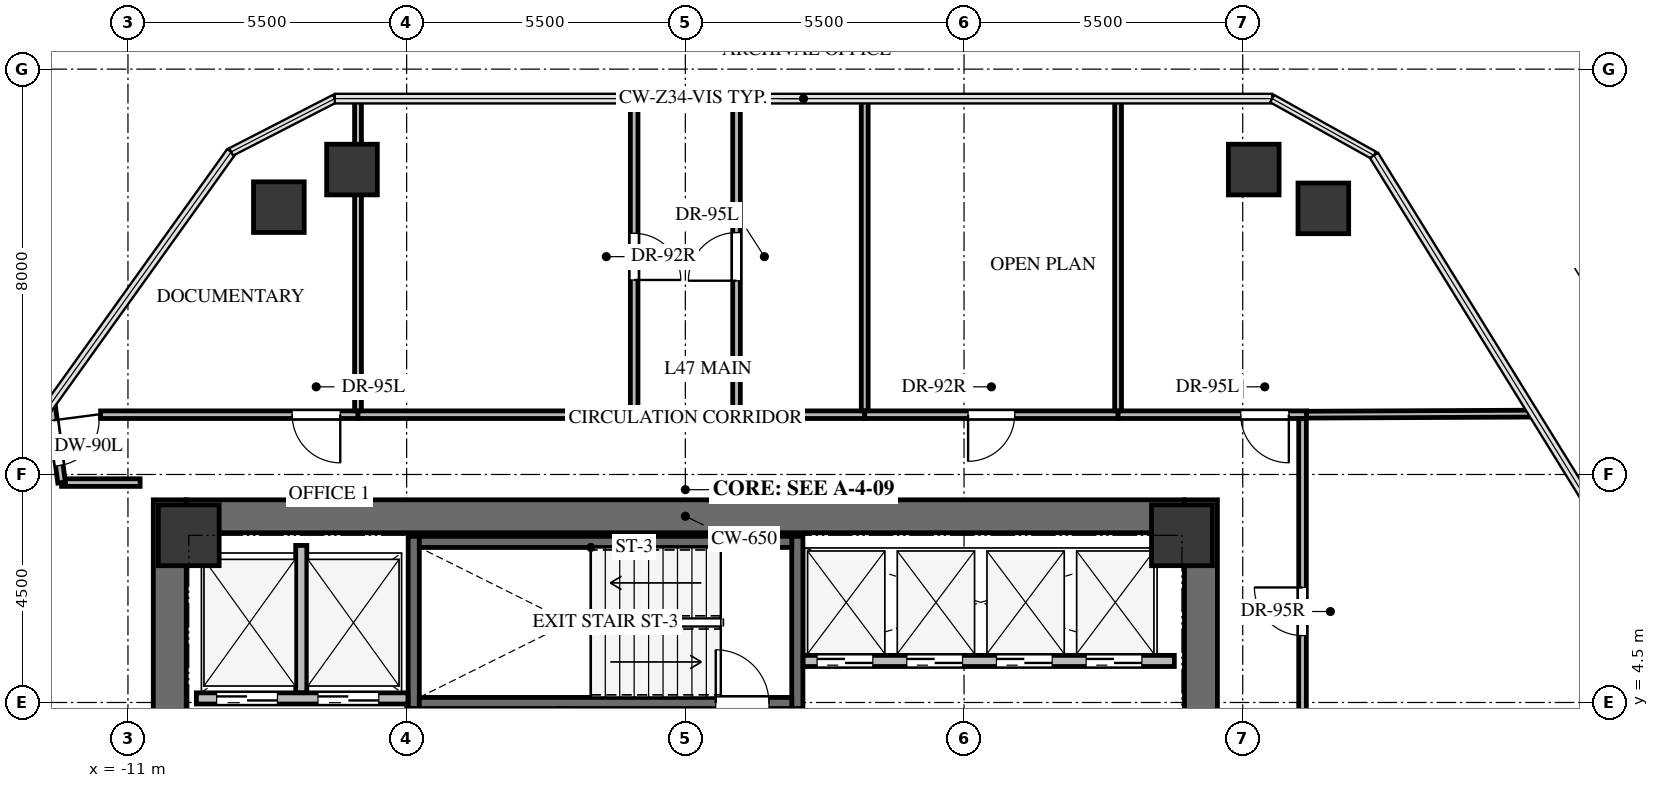
"""IFC4 building model, lengths in metres.
Left out: names, types, materials, properties, quantities, classifications, styles, units other than length and angle.
Written with IfcOpenShell. Run it as: python <this file> out.ifc"""

import sys

from ifc_helpers import new_model, si_unit, direction, frame, frame_2d, origin, origin_2d, place, context, subcontext, project, spatial, rectangle, extrude, source, transform, mapped, element, fill, save


model = new_model("IFC4")
c1 = context("Model", 3, precision=1e-05, world=origin(), true_north=direction((0.0, 1.0)))
c2 = subcontext(c1, "Body", "Model", "MODEL_VIEW")
j1 = project(units=[si_unit("LENGTHUNIT", "METRE"), si_unit("PLANEANGLEUNIT", "RADIAN")], contexts=[c1])
p1 = place(None, origin())
s1 = spatial("IfcSite", under=j1, at=p1, CompositionType="ELEMENT")
p2 = place(p1, origin())
s2 = spatial("IfcBuilding", under=s1, at=p2, CompositionType="ELEMENT")
p3 = place(p2, frame((0.0, 0.0, 173.8)))
s3 = spatial("IfcBuildingStorey", under=s2, at=p3, CompositionType="ELEMENT", Elevation=173.8)
for number, where, z_axis, x_axis in (
    (1, (-10.175, -8.5, 0.0), (0.0, 0.0, 1.0), (0.0, 1.0, 0.0)),
    (2, (10.175, -8.5, 0.0), (0.0, 0.0, 1.0), (0.0, 1.0, 0.0)),
):
    element("IfcWall", number, at=place(p3, frame(where, z_axis=z_axis, x_axis=x_axis)), inside=s3, PredefinedType="SHEAR", context=c2, shape_type="SweptSolid", body=[
        extrude(rectangle(XDim=17.0, YDim=0.65, at=frame_2d((8.5, 0.0))), origin(), (0.0, 0.0, 1.0), 3.3),
    ])
p4 = place(p3, frame((-9.85, 8.175, 0.0), z_axis=(0.0, 0.0, 1.0), x_axis=(1.0, 0.0, 0.0)))
e3 = element("IfcWall", 3, at=p4, inside=s3, PredefinedType="SHEAR", context=c2, shape_type="SweptSolid", body=[
    extrude(rectangle(XDim=19.7, YDim=0.65, at=frame_2d((9.85, 0.0))), origin(), (0.0, 0.0, 1.0), 3.3),
])
for number, where, z_axis, x_axis in (
    (4, (2.21, 4.38, -0.24), (0.0, 0.0, 1.0), (0.0, 1.0, 0.0)),
    (5, (-5.36, 7.78, -0.24), (0.0, 0.0, 1.0), (0.0, -1.0, 0.0)),
):
    element("IfcWall", number, at=place(p3, frame(where, z_axis=z_axis, x_axis=x_axis)), inside=s3, PredefinedType="SHEAR", context=c2, shape_type="SweptSolid", body=[
        extrude(rectangle(XDim=3.4, YDim=0.22, at=frame_2d((1.7, 0.0))), origin(), (0.0, 0.0, 1.0), 3.3),
    ])
p5 = place(p3, frame((-5.25, 4.49, -0.24), z_axis=(0.0, 0.0, 1.0), x_axis=(1.0, 0.0, 0.0)))
e6 = element("IfcWall", 6, at=p5, inside=s3, PredefinedType="SHEAR", context=c2, shape_type="SweptSolid", body=[
    extrude(rectangle(XDim=7.35, YDim=0.22, at=frame_2d((3.675, 0.0))), origin(), (0.0, 0.0, 1.0), 3.3),
])
p6 = place(p5, frame((5.85, 0.0, 0.0)))
e7 = element("IfcOpeningElement", 7, at=p6, cuts=e6, PredefinedType="OPENING", context=c2, shape_type="SweptSolid", body=[
    extrude(rectangle(XDim=1.05, YDim=2.15, at=frame_2d((0.525, 1.075))), frame((0.0, 0.12, 0.0), z_axis=(0.0, -1.0, 0.0), x_axis=(1.0, 0.0, 0.0)), (0.0, 0.0, 1.0), 0.24),
])
p7 = place(p3, frame((2.1, 7.67, -0.24), z_axis=(0.0, 0.0, 1.0), x_axis=(-1.0, 0.0, 0.0)))
e8 = element("IfcWall", 8, at=p7, inside=s3, PredefinedType="SHEAR", context=c2, shape_type="SweptSolid", body=[
    extrude(rectangle(XDim=7.35, YDim=0.22, at=frame_2d((3.675, 0.0))), origin(), (0.0, 0.0, 1.0), 3.3),
])
m1 = source(origin(), c2, "Body", "SweptSolid", [
    extrude(rectangle(XDim=1.2, YDim=1.2, at=origin_2d()), origin(), (0.0, 0.0, 1.0), 3.3),
])
for number, where, z_axis, x_axis in (
    (9, (9.8, 7.8, -0.24), (0.0, 0.0, 1.0), (1.0, 0.0, 0.0)),
    (10, (-9.8, 7.8, -0.24), (0.0, 0.0, 1.0), (1.0, 0.0, 0.0)),
):
    element("IfcColumn", number, at=place(p3, frame(where, z_axis=z_axis, x_axis=x_axis)), inside=s3, PredefinedType="COLUMN", context=c2, shape_type="MappedRepresentation", body=[
        mapped(m1, transform((0.0, 0.0, 0.0), x_axis=(1.0, 0.0, 0.0), y_axis=(0.0, 1.0, 0.0), z_axis=(0.0, 0.0, 1.0), scale=1.0)),
    ])
m2 = source(origin(), c2, "Body", "SweptSolid", [
    extrude(rectangle(XDim=1.0, YDim=1.0, at=origin_2d()), origin(), (0.0, 0.0, 1.0), 3.3),
])
for number, where, z_axis, x_axis in (
    (11, (-8.022, 14.276, -0.24), (0.0, 0.0, 1.0), (1.0, 0.0, 0.0)),
    (12, (-6.579, 15.018, -0.24), (0.0, 0.0, 1.0), (1.0, 0.0, 0.0)),
    (13, (11.218, 15.018, -0.24), (0.0, 0.0, 1.0), (1.0, 0.0, 0.0)),
    (14, (12.591, 14.252, -0.24), (0.0, 0.0, 1.0), (1.0, 0.0, 0.0)),
):
    element("IfcColumn", number, at=place(p3, frame(where, z_axis=z_axis, x_axis=x_axis)), inside=s3, PredefinedType="COLUMN", context=c2, shape_type="MappedRepresentation", body=[
        mapped(m2, transform((0.0, 0.0, 0.0), x_axis=(1.0, 0.0, 0.0), y_axis=(0.0, 1.0, 0.0), z_axis=(0.0, 0.0, 1.0), scale=1.0)),
    ])
p8 = place(p3, frame((-9.65, 4.58, 0.0), z_axis=(0.0, 0.0, 1.0), x_axis=(1.0, 0.0, 0.0)))
e15 = element("IfcWall", 15, at=p8, inside=s3, PredefinedType="SOLIDWALL", context=c2, shape_type="SweptSolid", body=[
    extrude(rectangle(XDim=4.175, YDim=0.22, at=frame_2d((2.087, 0.0))), origin(), (0.0, 0.0, 1.0), 3.045),
])
p9 = place(p8, frame((0.4, 0.0, 0.0)))
e16 = element("IfcOpeningElement", 16, at=p9, cuts=e15, PredefinedType="OPENING", context=c2, shape_type="SweptSolid", body=[
    extrude(rectangle(XDim=1.2, YDim=2.15, at=frame_2d((0.6, 1.075))), frame((0.0, 0.12, 0.0), z_axis=(0.0, -1.0, 0.0), x_axis=(1.0, 0.0, 0.0)), (0.0, 0.0, 1.0), 0.24),
])
p10 = place(p8, frame((2.4, 0.0, 0.0)))
e17 = element("IfcOpeningElement", 17, at=p10, cuts=e15, PredefinedType="OPENING", context=c2, shape_type="SweptSolid", body=[
    extrude(rectangle(XDim=1.2, YDim=2.15, at=frame_2d((0.6, 1.075))), frame((0.0, 0.12, 0.0), z_axis=(0.0, -1.0, 0.0), x_axis=(1.0, 0.0, 0.0)), (0.0, 0.0, 1.0), 0.24),
])
p11 = place(p3, frame((-7.58, 4.694, 0.0), z_axis=(0.0, 0.0, 1.0), x_axis=(0.0, 1.0, 0.0)))
e18 = element("IfcWall", 18, at=p11, inside=s3, PredefinedType="SOLIDWALL", context=c2, shape_type="SweptSolid", body=[
    extrude(rectangle(XDim=2.906, YDim=0.22, at=frame_2d((1.453, 0.0))), origin(), (0.0, 0.0, 1.0), 3.045),
])
p12 = place(p3, frame((2.325, 5.32, 0.0), z_axis=(0.0, 0.0, 1.0), x_axis=(1.0, 0.0, 0.0)))
e19 = element("IfcWall", 19, at=p12, inside=s3, PredefinedType="SOLIDWALL", context=c2, shape_type="SweptSolid", body=[
    extrude(rectangle(XDim=7.325, YDim=0.22, at=frame_2d((3.663, 0.0))), origin(), (0.0, 0.0, 1.0), 3.045),
])
p13 = place(p12, frame((0.275, 0.0, 0.0)))
e20 = element("IfcOpeningElement", 20, at=p13, cuts=e19, PredefinedType="OPENING", context=c2, shape_type="SweptSolid", body=[
    extrude(rectangle(XDim=1.1, YDim=2.15, at=frame_2d((0.55, 1.075))), frame((0.0, 0.12, 0.0), z_axis=(0.0, -1.0, 0.0), x_axis=(1.0, 0.0, 0.0)), (0.0, 0.0, 1.0), 0.24),
])
p14 = place(p12, frame((2.045, 0.0, 0.0)))
e21 = element("IfcOpeningElement", 21, at=p14, cuts=e19, PredefinedType="OPENING", context=c2, shape_type="SweptSolid", body=[
    extrude(rectangle(XDim=1.1, YDim=2.15, at=frame_2d((0.55, 1.075))), frame((0.0, 0.12, 0.0), z_axis=(0.0, -1.0, 0.0), x_axis=(1.0, 0.0, 0.0)), (0.0, 0.0, 1.0), 0.24),
])
p15 = place(p12, frame((3.815, 0.0, 0.0)))
e22 = element("IfcOpeningElement", 22, at=p15, cuts=e19, PredefinedType="OPENING", context=c2, shape_type="SweptSolid", body=[
    extrude(rectangle(XDim=1.1, YDim=2.15, at=frame_2d((0.55, 1.075))), frame((0.0, 0.12, 0.0), z_axis=(0.0, -1.0, 0.0), x_axis=(1.0, 0.0, 0.0)), (0.0, 0.0, 1.0), 0.24),
])
p16 = place(p12, frame((5.585, 0.0, 0.0)))
e23 = element("IfcOpeningElement", 23, at=p16, cuts=e19, PredefinedType="OPENING", context=c2, shape_type="SweptSolid", body=[
    extrude(rectangle(XDim=1.1, YDim=2.15, at=frame_2d((0.55, 1.075))), frame((0.0, 0.12, 0.0), z_axis=(0.0, -1.0, 0.0), x_axis=(1.0, 0.0, 0.0)), (0.0, 0.0, 1.0), 0.24),
])
p17 = place(p3, frame((-6.46, 10.18, 0.0), z_axis=(0.0, 0.0, 1.0), x_axis=(-1.0, 0.0, 0.0)))
e24 = element("IfcWall", 24, at=p17, inside=s3, PredefinedType="PARTITIONING", context=c2, shape_type="SweptSolid", body=[
    extrude(rectangle(XDim=5.08, YDim=0.15, at=frame_2d((2.54, 0.0))), origin(), (0.0, 0.0, 1.0), 2.242),
])
p18 = place(p17, frame((0.35, 0.0, 0.0)))
e25 = element("IfcOpeningElement", 25, at=p18, cuts=e24, PredefinedType="OPENING", context=c2, shape_type="SweptSolid", body=[
    extrude(rectangle(XDim=0.95, YDim=2.1, at=frame_2d((0.475, 1.05))), frame((0.0, 0.085, 0.0), z_axis=(0.0, -1.0, 0.0), x_axis=(1.0, 0.0, 0.0)), (0.0, 0.0, 1.0), 0.17),
])
p19 = place(p3, frame((-1.01, 16.418, 0.0), z_axis=(0.0, 0.0, 1.0), x_axis=(0.0, -1.0, 0.0)))
e26 = element("IfcWall", 26, at=p19, inside=s3, PredefinedType="PARTITIONING", context=c2, shape_type="SweptSolid", body=[
    extrude(rectangle(XDim=6.238, YDim=0.15, at=frame_2d((3.119, 0.0))), origin(), (0.0, 0.0, 1.0), 2.399),
])
p20 = place(p19, frame((2.659, 0.0, 0.0)))
e27 = element("IfcOpeningElement", 27, at=p20, cuts=e26, PredefinedType="OPENING", context=c2, shape_type="SweptSolid", body=[
    extrude(rectangle(XDim=0.92, YDim=2.1, at=frame_2d((0.46, 1.05))), frame((0.0, 0.085, 0.0), z_axis=(0.0, -1.0, 0.0), x_axis=(1.0, 0.0, 0.0)), (0.0, 0.0, 1.0), 0.17),
])
p21 = place(p3, frame((-1.089, 10.18, 0.0), z_axis=(0.0, 0.0, 1.0), x_axis=(-1.0, 0.0, 0.0)))
e28 = element("IfcWall", 28, at=p21, inside=s3, PredefinedType="PARTITIONING", context=c2, shape_type="SweptSolid", body=[
    extrude(rectangle(XDim=5.371, YDim=0.15, at=frame_2d((2.686, 0.0))), origin(), (0.0, 0.0, 1.0), 2.242),
])
p22 = place(p3, frame((1.01, 10.18, 0.0), z_axis=(0.0, 0.0, 1.0), x_axis=(0.0, 1.0, 0.0)))
e29 = element("IfcWall", 29, at=p22, inside=s3, PredefinedType="PARTITIONING", context=c2, shape_type="SweptSolid", body=[
    extrude(rectangle(XDim=6.238, YDim=0.15, at=frame_2d((3.119, 0.0))), origin(), (0.0, 0.0, 1.0), 2.399),
])
p23 = place(p22, frame((2.644, 0.0, 0.0)))
e30 = element("IfcOpeningElement", 30, at=p23, cuts=e29, PredefinedType="OPENING", context=c2, shape_type="SweptSolid", body=[
    extrude(rectangle(XDim=0.95, YDim=2.1, at=frame_2d((0.475, 1.05))), frame((0.0, 0.085, 0.0), z_axis=(0.0, -1.0, 0.0), x_axis=(1.0, 0.0, 0.0)), (0.0, 0.0, 1.0), 0.17),
])
p24 = place(p3, frame((3.54, 10.18, 0.0), z_axis=(0.0, 0.0, 1.0), x_axis=(-1.0, 0.0, 0.0)))
e31 = element("IfcWall", 31, at=p24, inside=s3, PredefinedType="PARTITIONING", context=c2, shape_type="SweptSolid", body=[
    extrude(rectangle(XDim=2.451, YDim=0.15, at=frame_2d((1.226, 0.0))), origin(), (0.0, 0.0, 1.0), 3.045),
])
p25 = place(p3, frame((8.54, 10.18, 0.0), z_axis=(0.0, 0.0, 1.0), x_axis=(-1.0, 0.0, 0.0)))
e32 = element("IfcWall", 32, at=p25, inside=s3, PredefinedType="PARTITIONING", context=c2, shape_type="SweptSolid", body=[
    extrude(rectangle(XDim=5.0, YDim=0.15, at=frame_2d((2.5, 0.0))), origin(), (0.0, 0.0, 1.0), 2.608),
])
p26 = place(p25, frame((2.04, 0.0, 0.0)))
e33 = element("IfcOpeningElement", 33, at=p26, cuts=e32, PredefinedType="OPENING", context=c2, shape_type="SweptSolid", body=[
    extrude(rectangle(XDim=0.92, YDim=2.1, at=frame_2d((0.46, 1.05))), frame((0.0, 0.085, 0.0), z_axis=(0.0, -1.0, 0.0), x_axis=(1.0, 0.0, 0.0)), (0.0, 0.0, 1.0), 0.17),
])
p27 = place(p3, frame((12.26, 10.18, 0.0), z_axis=(0.0, 0.0, 1.0), x_axis=(-1.0, 0.0, 0.0)))
e34 = element("IfcWall", 34, at=p27, inside=s3, PredefinedType="PARTITIONING", context=c2, shape_type="SweptSolid", body=[
    extrude(rectangle(XDim=3.72, YDim=0.15, at=frame_2d((1.86, 0.0))), origin(), (0.0, 0.0, 1.0), 2.242),
])
p28 = place(p27, frame((0.35, 0.0, 0.0)))
e35 = element("IfcOpeningElement", 35, at=p28, cuts=e34, PredefinedType="OPENING", context=c2, shape_type="SweptSolid", body=[
    extrude(rectangle(XDim=0.95, YDim=2.1, at=frame_2d((0.475, 1.05))), frame((0.0, 0.085, 0.0), z_axis=(0.0, -1.0, 0.0), x_axis=(1.0, 0.0, 0.0)), (0.0, 0.0, 1.0), 0.17),
])
p29 = place(p3, frame((-12.31, 8.84, 0.0), z_axis=(0.0, 0.0, 1.0), x_axis=(1.0, 0.0, 0.0)))
e36 = element("IfcWall", 36, at=p29, inside=s3, PredefinedType="PARTITIONING", context=c2, shape_type="SweptSolid", body=[
    extrude(rectangle(XDim=1.55, YDim=0.15, at=frame_2d((0.775, 0.0))), origin(), (0.0, 0.0, 1.0), 2.399),
])
p30 = place(p3, frame((-12.514, 10.406, 0.0), z_axis=(0.0, 0.0, 1.0), x_axis=(0.129378833178, -0.991595238757, 0.0)))
e37 = element("IfcWall", 37, at=p30, inside=s3, PredefinedType="PARTITIONING", context=c2, shape_type="SweptSolid", body=[
    extrude(rectangle(XDim=1.579, YDim=0.15, at=frame_2d((0.79, 0.0))), origin(), (0.0, 0.0, 1.0), 3.045),
])
p31 = place(p30, frame((0.34, 0.0, 0.0)))
e38 = element("IfcOpeningElement", 38, at=p31, cuts=e37, PredefinedType="OPENING", context=c2, shape_type="SweptSolid", body=[
    extrude(rectangle(XDim=0.9, YDim=2.05, at=frame_2d((0.45, 1.025))), frame((0.0, 0.085, 0.0), z_axis=(0.0, -1.0, 0.0), x_axis=(1.0, 0.0, 0.0)), (0.0, 0.0, 1.0), 0.17),
])
p32 = place(p3, frame((12.18, 2.49, 0.0), z_axis=(0.0, 0.0, 1.0), x_axis=(0.0, 1.0, 0.0)))
e39 = element("IfcWall", 39, at=p32, inside=s3, PredefinedType="PARTITIONING", context=c2, shape_type="SweptSolid", body=[
    extrude(rectangle(XDim=7.611, YDim=0.15, at=frame_2d((3.806, 0.0))), origin(), (0.0, 0.0, 1.0), 3.045),
])
p33 = place(p32, frame((3.331, 0.0, 0.0)))
e40 = element("IfcOpeningElement", 40, at=p33, cuts=e39, PredefinedType="OPENING", context=c2, shape_type="SweptSolid", body=[
    extrude(rectangle(XDim=0.95, YDim=2.1, at=frame_2d((0.475, 1.05))), frame((0.0, 0.085, 0.0), z_axis=(0.0, -1.0, 0.0), x_axis=(1.0, 0.0, 0.0)), (0.0, 0.0, 1.0), 0.17),
])
p34 = place(p3, frame((-6.46, 15.102, 0.0), z_axis=(0.0, 0.0, 1.0), x_axis=(0.0, -1.0, 0.0)))
e41 = element("IfcWall", 41, at=p34, inside=s3, PredefinedType="PARTITIONING", context=c2, shape_type="SweptSolid", body=[
    extrude(rectangle(XDim=4.843, YDim=0.135, at=frame_2d((2.421, 0.0))), origin(), (0.0, 0.0, 1.0), 2.242),
])
p35 = place(p3, frame((-6.46, 16.418, 0.0), z_axis=(0.0, 0.0, 1.0), x_axis=(0.0, -1.0, 0.0)))
e42 = element("IfcWall", 42, at=p35, inside=s3, PredefinedType="PARTITIONING", context=c2, shape_type="SweptSolid", body=[
    extrude(rectangle(XDim=1.316, YDim=0.135, at=frame_2d((0.658, 0.0))), origin(), (0.0, 0.0, 1.0), 1.877),
])
for number, where, z_axis, x_axis in (
    (43, (3.54, 16.418, 0.0), (0.0, 0.0, 1.0), (0.0, -1.0, 0.0)),
    (44, (8.54, 16.418, 0.0), (0.0, 0.0, 1.0), (0.0, -1.0, 0.0)),
):
    element("IfcWall", number, at=place(p3, frame(where, z_axis=z_axis, x_axis=x_axis)), inside=s3, PredefinedType="PARTITIONING", context=c2, shape_type="SweptSolid", body=[
        extrude(rectangle(XDim=6.159, YDim=0.135, at=frame_2d((3.08, 0.0))), origin(), (0.0, 0.0, 1.0), 2.399),
    ])
p36 = place(p3, frame((16.74, 10.201, 0.0), z_axis=(0.0, 0.0, 1.0), x_axis=(-0.999989522694, -0.004577608714, 0.0)))
e45 = element("IfcWall", 45, at=p36, inside=s3, PredefinedType="PARTITIONING", context=c2, shape_type="SweptSolid", body=[
    extrude(rectangle(XDim=4.48, YDim=0.135, at=frame_2d((2.24, 0.0))), origin(), (0.0, 0.0, 1.0), 2.399),
])
m3 = source(origin(), c2, "Body", "SweptSolid", [
    extrude(rectangle(XDim=1.05, YDim=2.15, at=frame_2d((0.525, 1.075))), frame((0.0, 0.025, 0.0), z_axis=(0.0, -1.0, 0.0), x_axis=(1.0, 0.0, 0.0)), (0.0, 0.0, 1.0), 0.05),
])
p37 = place(p6, origin())
e46 = element("IfcDoor", 46, at=p37, inside=s3, OperationType="SINGLE_SWING_LEFT", PredefinedType="DOOR", context=c2, shape_type="MappedRepresentation", body=[
    mapped(m3, transform((0.0, 0.0, 0.0), x_axis=(1.0, 0.0, 0.0), y_axis=(0.0, 1.0, 0.0), z_axis=(0.0, 0.0, 1.0), scale=1.0)),
])
fill(e7, e46)
m4 = source(origin(), c2, "Body", "SweptSolid", [
    extrude(rectangle(XDim=1.2, YDim=2.15, at=frame_2d((0.6, 1.075))), frame((0.0, 0.025, 0.0), z_axis=(0.0, -1.0, 0.0), x_axis=(1.0, 0.0, 0.0)), (0.0, 0.0, 1.0), 0.05),
])
p38 = place(p9, origin())
e47 = element("IfcDoor", 47, at=p38, inside=s3, OperationType="DOUBLE_DOOR_SLIDING", PredefinedType="DOOR", context=c2, shape_type="MappedRepresentation", body=[
    mapped(m4, transform((0.0, 0.0, 0.0), x_axis=(1.0, 0.0, 0.0), y_axis=(0.0, 1.0, 0.0), z_axis=(0.0, 0.0, 1.0), scale=1.0)),
])
fill(e16, e47)
p39 = place(p10, origin())
e48 = element("IfcDoor", 48, at=p39, inside=s3, OperationType="DOUBLE_DOOR_SLIDING", PredefinedType="DOOR", context=c2, shape_type="MappedRepresentation", body=[
    mapped(m4, transform((0.0, 0.0, 0.0), x_axis=(1.0, 0.0, 0.0), y_axis=(0.0, 1.0, 0.0), z_axis=(0.0, 0.0, 1.0), scale=1.0)),
])
fill(e17, e48)
m5 = source(origin(), c2, "Body", "SweptSolid", [
    extrude(rectangle(XDim=1.1, YDim=2.15, at=frame_2d((0.55, 1.075))), frame((0.0, 0.025, 0.0), z_axis=(0.0, -1.0, 0.0), x_axis=(1.0, 0.0, 0.0)), (0.0, 0.0, 1.0), 0.05),
])
p40 = place(p13, origin())
e49 = element("IfcDoor", 49, at=p40, inside=s3, OperationType="DOUBLE_DOOR_SLIDING", PredefinedType="DOOR", context=c2, shape_type="MappedRepresentation", body=[
    mapped(m5, transform((0.0, 0.0, 0.0), x_axis=(1.0, 0.0, 0.0), y_axis=(0.0, 1.0, 0.0), z_axis=(0.0, 0.0, 1.0), scale=1.0)),
])
fill(e20, e49)
p41 = place(p14, origin())
e50 = element("IfcDoor", 50, at=p41, inside=s3, OperationType="DOUBLE_DOOR_SLIDING", PredefinedType="DOOR", context=c2, shape_type="MappedRepresentation", body=[
    mapped(m5, transform((0.0, 0.0, 0.0), x_axis=(1.0, 0.0, 0.0), y_axis=(0.0, 1.0, 0.0), z_axis=(0.0, 0.0, 1.0), scale=1.0)),
])
fill(e21, e50)
p42 = place(p15, origin())
e51 = element("IfcDoor", 51, at=p42, inside=s3, OperationType="DOUBLE_DOOR_SLIDING", PredefinedType="DOOR", context=c2, shape_type="MappedRepresentation", body=[
    mapped(m5, transform((0.0, 0.0, 0.0), x_axis=(1.0, 0.0, 0.0), y_axis=(0.0, 1.0, 0.0), z_axis=(0.0, 0.0, 1.0), scale=1.0)),
])
fill(e22, e51)
p43 = place(p16, origin())
e52 = element("IfcDoor", 52, at=p43, inside=s3, OperationType="DOUBLE_DOOR_SLIDING", PredefinedType="DOOR", context=c2, shape_type="MappedRepresentation", body=[
    mapped(m5, transform((0.0, 0.0, 0.0), x_axis=(1.0, 0.0, 0.0), y_axis=(0.0, 1.0, 0.0), z_axis=(0.0, 0.0, 1.0), scale=1.0)),
])
fill(e23, e52)
m6 = source(origin(), c2, "Body", "SweptSolid", [
    extrude(rectangle(XDim=0.95, YDim=2.1, at=frame_2d((0.475, 1.05))), frame((0.0, 0.025, 0.0), z_axis=(0.0, -1.0, 0.0), x_axis=(1.0, 0.0, 0.0)), (0.0, 0.0, 1.0), 0.05),
])
p44 = place(p18, origin())
e53 = element("IfcDoor", 53, at=p44, inside=s3, OperationType="SINGLE_SWING_LEFT", PredefinedType="DOOR", context=c2, shape_type="MappedRepresentation", body=[
    mapped(m6, transform((0.0, 0.0, 0.0), x_axis=(1.0, 0.0, 0.0), y_axis=(0.0, 1.0, 0.0), z_axis=(0.0, 0.0, 1.0), scale=1.0)),
])
fill(e25, e53)
m7 = source(origin(), c2, "Body", "SweptSolid", [
    extrude(rectangle(XDim=0.92, YDim=2.1, at=frame_2d((0.46, 1.05))), frame((0.0, 0.025, 0.0), z_axis=(0.0, -1.0, 0.0), x_axis=(1.0, 0.0, 0.0)), (0.0, 0.0, 1.0), 0.05),
])
p45 = place(p20, origin())
e54 = element("IfcDoor", 54, at=p45, inside=s3, OperationType="SINGLE_SWING_RIGHT", PredefinedType="DOOR", context=c2, shape_type="MappedRepresentation", body=[
    mapped(m7, transform((0.0, 0.0, 0.0), x_axis=(1.0, 0.0, 0.0), y_axis=(0.0, 1.0, 0.0), z_axis=(0.0, 0.0, 1.0), scale=1.0)),
])
fill(e27, e54)
p46 = place(p23, origin())
e55 = element("IfcDoor", 55, at=p46, inside=s3, OperationType="SINGLE_SWING_LEFT", PredefinedType="DOOR", context=c2, shape_type="MappedRepresentation", body=[
    mapped(m6, transform((0.0, 0.0, 0.0), x_axis=(1.0, 0.0, 0.0), y_axis=(0.0, 1.0, 0.0), z_axis=(0.0, 0.0, 1.0), scale=1.0)),
])
fill(e30, e55)
p47 = place(p26, origin())
e56 = element("IfcDoor", 56, at=p47, inside=s3, OperationType="SINGLE_SWING_RIGHT", PredefinedType="DOOR", context=c2, shape_type="MappedRepresentation", body=[
    mapped(m7, transform((0.0, 0.0, 0.0), x_axis=(1.0, 0.0, 0.0), y_axis=(0.0, 1.0, 0.0), z_axis=(0.0, 0.0, 1.0), scale=1.0)),
])
fill(e33, e56)
p48 = place(p28, origin())
e57 = element("IfcDoor", 57, at=p48, inside=s3, OperationType="SINGLE_SWING_LEFT", PredefinedType="DOOR", context=c2, shape_type="MappedRepresentation", body=[
    mapped(m6, transform((0.0, 0.0, 0.0), x_axis=(1.0, 0.0, 0.0), y_axis=(0.0, 1.0, 0.0), z_axis=(0.0, 0.0, 1.0), scale=1.0)),
])
fill(e35, e57)
m8 = source(origin(), c2, "Body", "SweptSolid", [
    extrude(rectangle(XDim=0.9, YDim=2.05, at=frame_2d((0.45, 1.025))), frame((0.0, 0.025, 0.0), z_axis=(0.0, -1.0, 0.0), x_axis=(1.0, 0.0, 0.0)), (0.0, 0.0, 1.0), 0.05),
])
p49 = place(p31, origin())
e58 = element("IfcDoor", 58, at=p49, inside=s3, OperationType="SINGLE_SWING_LEFT", PredefinedType="DOOR", context=c2, shape_type="MappedRepresentation", body=[
    mapped(m8, transform((0.0, 0.0, 0.0), x_axis=(1.0, 0.0, 0.0), y_axis=(0.0, 1.0, 0.0), z_axis=(0.0, 0.0, 1.0), scale=1.0)),
])
fill(e38, e58)
m9 = source(origin(), c2, "Body", "SweptSolid", [
    extrude(rectangle(XDim=0.95, YDim=2.1, at=frame_2d((0.475, 1.05))), frame((0.0, 0.025, 0.0), z_axis=(0.0, -1.0, 0.0), x_axis=(1.0, 0.0, 0.0)), (0.0, 0.0, 1.0), 0.05),
])
p50 = place(p33, origin())
e59 = element("IfcDoor", 59, at=p50, inside=s3, OperationType="SINGLE_SWING_RIGHT", PredefinedType="DOOR", context=c2, shape_type="MappedRepresentation", body=[
    mapped(m9, transform((0.0, 0.0, 0.0), x_axis=(1.0, 0.0, 0.0), y_axis=(0.0, 1.0, 0.0), z_axis=(0.0, 0.0, 1.0), scale=1.0)),
])
fill(e40, e59)
save(model, sys.argv[1])
